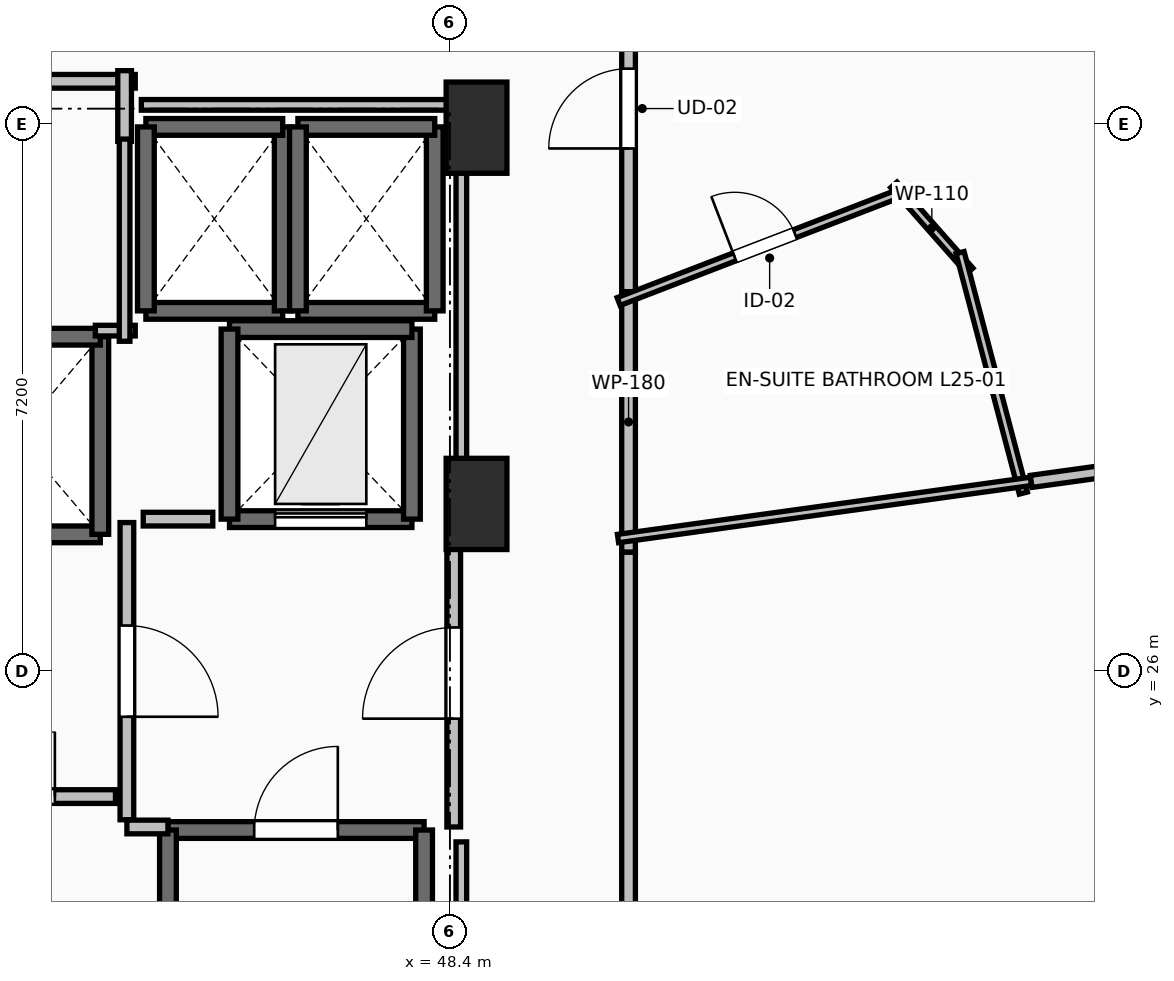
"""IFC4 building model, lengths in metres.
Left out: names, types, materials, properties, quantities, classifications, styles, units other than length and angle.
Written with IfcOpenShell. Run it as: python <this file> out.ifc"""

import sys

from ifc_helpers import new_model, si_unit, direction, frame, frame_2d, origin, origin_2d, place, context, subcontext, project, spatial, rectangle, extrude, element, fill, save


model = new_model("IFC4")
c1 = context("Model", 3, precision=1e-05, world=origin(), true_north=direction((0.0, 1.0)))
c2 = subcontext(c1, "Body", "Model", "MODEL_VIEW")
j1 = project(units=[si_unit("LENGTHUNIT", "METRE"), si_unit("PLANEANGLEUNIT", "RADIAN")], contexts=[c1])
p1 = place(None, origin())
s1 = spatial("IfcSite", under=j1, at=p1, CompositionType="ELEMENT")
p2 = place(p1, origin())
s2 = spatial("IfcBuilding", under=s1, at=p2, CompositionType="ELEMENT")
p3 = place(p2, frame((0.0, 0.0, 96.3)))
s3 = spatial("IfcBuildingStorey", under=s2, at=p3, CompositionType="ELEMENT", Elevation=96.3)
for number, where, z_axis, x_axis in (
    (1, (48.75, 33.15, 0.0), (0.0, 0.0, 1.0), (1.0, 0.0, 0.0)),
    (2, (48.75, 28.2, 0.0), (0.0, 0.0, 1.0), (1.0, 0.0, 0.0)),
):
    element("IfcColumn", number, at=place(p3, frame(where, z_axis=z_axis, x_axis=x_axis)), inside=s3, PredefinedType="PILASTER", context=c2, shape_type="SweptSolid", body=[
        extrude(rectangle(XDim=0.8, YDim=1.2, at=origin_2d()), origin(), (0.0, 0.0, 1.0), 3.5),
    ])
p4 = place(p3, frame((44.69, 23.91, 0.0), z_axis=(0.0, 0.0, 1.0), x_axis=(1.0, 0.0, 0.0)))
e3 = element("IfcWall", 3, at=p4, inside=s3, PredefinedType="SOLIDWALL", context=c2, shape_type="SweptSolid", body=[
    extrude(rectangle(XDim=3.37, YDim=0.22, at=frame_2d((1.685, 0.0))), origin(), (0.0, 0.0, 1.0), 3.24),
])
p5 = place(p4, frame((1.135, 0.0, 0.0)))
e4 = element("IfcOpeningElement", 4, at=p5, cuts=e3, PredefinedType="OPENING", context=c2, shape_type="SweptSolid", body=[
    extrude(rectangle(XDim=1.1, YDim=2.15, at=frame_2d((0.55, 1.075))), frame((0.0, 0.125, 0.0), z_axis=(0.0, -1.0, 0.0), x_axis=(1.0, 0.0, 0.0)), (0.0, 0.0, 1.0), 0.25),
])
for number, where, z_axis, x_axis in (
    (5, (48.06, 23.91, 0.0), (0.0, 0.0, 1.0), (0.0, -1.0, 0.0)),
    (6, (44.69, 16.49, 0.0), (0.0, 0.0, 1.0), (0.0, 1.0, 0.0)),
):
    element("IfcWall", number, at=place(p3, frame(where, z_axis=z_axis, x_axis=x_axis)), inside=s3, PredefinedType="SOLIDWALL", context=c2, shape_type="SweptSolid", body=[
        extrude(rectangle(XDim=7.42, YDim=0.22, at=frame_2d((3.71, 0.0))), origin(), (0.0, 0.0, 1.0), 3.24),
    ])
p6 = place(p3, frame((41.6, 27.8, 0.0), z_axis=(0.0, 0.0, 1.0), x_axis=(1.0, 0.0, 0.0)))
e7 = element("IfcWall", 7, at=p6, inside=s3, PredefinedType="SOLIDWALL", context=c2, shape_type="SweptSolid", body=[
    extrude(rectangle(XDim=2.2, YDim=0.22, at=frame_2d((1.1, 0.0))), origin(), (0.0, 0.0, 1.0), 3.24),
])
p7 = place(p3, frame((43.8, 27.8, 0.0), z_axis=(0.0, 0.0, 1.0), x_axis=(0.0, 1.0, 0.0)))
e8 = element("IfcWall", 8, at=p7, inside=s3, PredefinedType="SOLIDWALL", context=c2, shape_type="SweptSolid", body=[
    extrude(rectangle(XDim=2.6, YDim=0.22, at=frame_2d((1.3, 0.0))), origin(), (0.0, 0.0, 1.0), 3.24),
])
p8 = place(p3, frame((43.8, 30.4, 0.0), z_axis=(0.0, 0.0, 1.0), x_axis=(-1.0, 0.0, 0.0)))
e9 = element("IfcWall", 9, at=p8, inside=s3, PredefinedType="SOLIDWALL", context=c2, shape_type="SweptSolid", body=[
    extrude(rectangle(XDim=2.2, YDim=0.22, at=frame_2d((1.1, 0.0))), origin(), (0.0, 0.0, 1.0), 3.24),
])
p9 = place(p3, frame((44.4, 30.74, 0.0), z_axis=(0.0, 0.0, 1.0), x_axis=(1.0, 0.0, 0.0)))
e10 = element("IfcWall", 10, at=p9, inside=s3, PredefinedType="SOLIDWALL", context=c2, shape_type="SweptSolid", body=[
    extrude(rectangle(XDim=1.8, YDim=0.22, at=frame_2d((0.9, 0.0))), origin(), (0.0, 0.0, 1.0), 3.24),
])
p10 = place(p3, frame((46.2, 30.74, 0.0), z_axis=(0.0, 0.0, 1.0), x_axis=(0.0, 1.0, 0.0)))
e11 = element("IfcWall", 11, at=p10, inside=s3, PredefinedType="SOLIDWALL", context=c2, shape_type="SweptSolid", body=[
    extrude(rectangle(XDim=2.42, YDim=0.22, at=frame_2d((1.21, 0.0))), origin(), (0.0, 0.0, 1.0), 3.24),
])
p11 = place(p3, frame((46.2, 33.16, 0.0), z_axis=(0.0, 0.0, 1.0), x_axis=(-1.0, 0.0, 0.0)))
e12 = element("IfcWall", 12, at=p11, inside=s3, PredefinedType="SOLIDWALL", context=c2, shape_type="SweptSolid", body=[
    extrude(rectangle(XDim=1.8, YDim=0.22, at=frame_2d((0.9, 0.0))), origin(), (0.0, 0.0, 1.0), 3.24),
])
p12 = place(p3, frame((44.4, 33.16, 0.0), z_axis=(0.0, 0.0, 1.0), x_axis=(0.0, -1.0, 0.0)))
e13 = element("IfcWall", 13, at=p12, inside=s3, PredefinedType="SOLIDWALL", context=c2, shape_type="SweptSolid", body=[
    extrude(rectangle(XDim=2.42, YDim=0.22, at=frame_2d((1.21, 0.0))), origin(), (0.0, 0.0, 1.0), 3.24),
])
p13 = place(p3, frame((46.4, 30.74, 0.0), z_axis=(0.0, 0.0, 1.0), x_axis=(1.0, 0.0, 0.0)))
e14 = element("IfcWall", 14, at=p13, inside=s3, PredefinedType="SOLIDWALL", context=c2, shape_type="SweptSolid", body=[
    extrude(rectangle(XDim=1.8, YDim=0.22, at=frame_2d((0.9, 0.0))), origin(), (0.0, 0.0, 1.0), 3.24),
])
p14 = place(p3, frame((48.2, 30.74, 0.0), z_axis=(0.0, 0.0, 1.0), x_axis=(0.0, 1.0, 0.0)))
e15 = element("IfcWall", 15, at=p14, inside=s3, PredefinedType="SOLIDWALL", context=c2, shape_type="SweptSolid", body=[
    extrude(rectangle(XDim=2.42, YDim=0.22, at=frame_2d((1.21, 0.0))), origin(), (0.0, 0.0, 1.0), 3.24),
])
p15 = place(p3, frame((48.2, 33.16, 0.0), z_axis=(0.0, 0.0, 1.0), x_axis=(-1.0, 0.0, 0.0)))
e16 = element("IfcWall", 16, at=p15, inside=s3, PredefinedType="SOLIDWALL", context=c2, shape_type="SweptSolid", body=[
    extrude(rectangle(XDim=1.8, YDim=0.22, at=frame_2d((0.9, 0.0))), origin(), (0.0, 0.0, 1.0), 3.24),
])
p16 = place(p3, frame((46.4, 33.16, 0.0), z_axis=(0.0, 0.0, 1.0), x_axis=(0.0, -1.0, 0.0)))
e17 = element("IfcWall", 17, at=p16, inside=s3, PredefinedType="SOLIDWALL", context=c2, shape_type="SweptSolid", body=[
    extrude(rectangle(XDim=2.42, YDim=0.22, at=frame_2d((1.21, 0.0))), origin(), (0.0, 0.0, 1.0), 3.24),
])
p17 = place(p3, frame((45.5, 28.0, 0.0), z_axis=(0.0, 0.0, 1.0), x_axis=(1.0, 0.0, 0.0)))
e18 = element("IfcWall", 18, at=p17, inside=s3, PredefinedType="SHEAR", context=c2, shape_type="SweptSolid", body=[
    extrude(rectangle(XDim=2.4, YDim=0.22, at=frame_2d((1.2, 0.0))), origin(), (0.0, 0.0, 1.0), 3.24),
])
p18 = place(p17, frame((0.6, 0.0, 0.0)))
e19 = element("IfcOpeningElement", 19, at=p18, cuts=e18, PredefinedType="OPENING", context=c2, shape_type="SweptSolid", body=[
    extrude(rectangle(XDim=1.2, YDim=2.2, at=frame_2d((0.6, 1.1))), frame((0.0, 0.125, 0.0), z_axis=(0.0, -1.0, 0.0), x_axis=(1.0, 0.0, 0.0)), (0.0, 0.0, 1.0), 0.25),
])
p19 = place(p3, frame((47.9, 28.0, 0.0), z_axis=(0.0, 0.0, 1.0), x_axis=(0.0, 1.0, 0.0)))
e20 = element("IfcWall", 20, at=p19, inside=s3, PredefinedType="SHEAR", context=c2, shape_type="SweptSolid", body=[
    extrude(rectangle(XDim=2.5, YDim=0.22, at=frame_2d((1.25, 0.0))), origin(), (0.0, 0.0, 1.0), 3.24),
])
p20 = place(p3, frame((47.9, 30.5, 0.0), z_axis=(0.0, 0.0, 1.0), x_axis=(-1.0, 0.0, 0.0)))
e21 = element("IfcWall", 21, at=p20, inside=s3, PredefinedType="SHEAR", context=c2, shape_type="SweptSolid", body=[
    extrude(rectangle(XDim=2.4, YDim=0.22, at=frame_2d((1.2, 0.0))), origin(), (0.0, 0.0, 1.0), 3.24),
])
p21 = place(p3, frame((45.5, 30.5, 0.0), z_axis=(0.0, 0.0, 1.0), x_axis=(0.0, -1.0, 0.0)))
e22 = element("IfcWall", 22, at=p21, inside=s3, PredefinedType="SHEAR", context=c2, shape_type="SweptSolid", body=[
    extrude(rectangle(XDim=2.5, YDim=0.22, at=frame_2d((1.25, 0.0))), origin(), (0.0, 0.0, 1.0), 3.24),
])
p22 = place(p3, frame((44.15, 27.955, 0.0), z_axis=(0.0, 0.0, 1.0), x_axis=(0.0, -1.0, 0.0)))
e23 = element("IfcWall", 23, at=p22, inside=s3, PredefinedType="PARTITIONING", context=c2, shape_type="SweptSolid", body=[
    extrude(rectangle(XDim=3.91, YDim=0.18, at=frame_2d((1.955, 0.0))), origin(), (0.0, 0.0, 1.0), 3.24),
])
p23 = place(p22, frame((1.355, 0.0, 0.0)))
e24 = element("IfcOpeningElement", 24, at=p23, cuts=e23, PredefinedType="OPENING", context=c2, shape_type="SweptSolid", body=[
    extrude(rectangle(XDim=1.2, YDim=2.15, at=frame_2d((0.6, 1.075))), frame((0.0, 0.105, 0.0), z_axis=(0.0, -1.0, 0.0), x_axis=(1.0, 0.0, 0.0)), (0.0, 0.0, 1.0), 0.21),
])
p24 = place(p3, frame((44.15, 23.95, 0.0), z_axis=(0.0, 0.0, 1.0), x_axis=(1.0, 0.0, 0.0)))
e25 = element("IfcWall", 25, at=p24, inside=s3, PredefinedType="PARTITIONING", context=c2, shape_type="SweptSolid", body=[
    extrude(rectangle(XDim=0.54, YDim=0.18, at=frame_2d((0.27, 0.0))), origin(), (0.0, 0.0, 1.0), 3.24),
])
p25 = place(p3, frame((48.45, 23.95, 0.0), z_axis=(0.0, 0.0, 1.0), x_axis=(0.0, 1.0, 0.0)))
e26 = element("IfcWall", 26, at=p25, inside=s3, PredefinedType="PARTITIONING", context=c2, shape_type="SweptSolid", body=[
    extrude(rectangle(XDim=4.05, YDim=0.18, at=frame_2d((2.025, 0.0))), origin(), (0.0, 0.0, 1.0), 3.24),
])
p26 = place(p25, frame((1.425, 0.0, 0.0)))
e27 = element("IfcOpeningElement", 27, at=p26, cuts=e26, PredefinedType="OPENING", context=c2, shape_type="SweptSolid", body=[
    extrude(rectangle(XDim=1.2, YDim=2.15, at=frame_2d((0.6, 1.075))), frame((0.0, 0.105, 0.0), z_axis=(0.0, -1.0, 0.0), x_axis=(1.0, 0.0, 0.0)), (0.0, 0.0, 1.0), 0.21),
])
p27 = place(p3, frame((41.555, 24.35, 0.0), z_axis=(0.0, 0.0, 1.0), x_axis=(1.0, 0.0, 0.0)))
e28 = element("IfcWall", 28, at=p27, inside=s3, PredefinedType="PARTITIONING", context=c2, shape_type="SweptSolid", body=[
    extrude(rectangle(XDim=2.445, YDim=0.18, at=frame_2d((1.223, 0.0))), origin(), (0.0, 0.0, 1.0), 3.24),
])
p28 = place(p27, frame((0.798, 0.0, 0.0)))
e29 = element("IfcOpeningElement", 29, at=p28, cuts=e28, PredefinedType="OPENING", context=c2, shape_type="SweptSolid", body=[
    extrude(rectangle(XDim=0.85, YDim=2.1, at=frame_2d((0.425, 1.05))), frame((0.0, 0.105, 0.0), z_axis=(0.0, -1.0, 0.0), x_axis=(1.0, 0.0, 0.0)), (0.0, 0.0, 1.0), 0.21),
])
p29 = place(p3, frame((44.26, 33.76, 0.0), z_axis=(0.0, 0.0, 1.0), x_axis=(-1.0, 0.0, 0.0)))
e30 = element("IfcWall", 30, at=p29, inside=s3, PredefinedType="PARTITIONING", context=c2, shape_type="SweptSolid", body=[
    extrude(rectangle(XDim=6.91, YDim=0.18, at=frame_2d((3.455, 0.0))), origin(), (0.0, 0.0, 1.0), 3.24),
])
p30 = place(p29, frame((3.03, 0.0, 0.0)))
e31 = element("IfcOpeningElement", 31, at=p30, cuts=e30, PredefinedType="OPENING", context=c2, shape_type="SweptSolid", body=[
    extrude(rectangle(XDim=0.85, YDim=2.1, at=frame_2d((0.425, 1.05))), frame((0.0, 0.105, 0.0), z_axis=(0.0, -1.0, 0.0), x_axis=(1.0, 0.0, 0.0)), (0.0, 0.0, 1.0), 0.21),
])
p31 = place(p3, frame((44.12, 32.97, 0.0), z_axis=(0.0, 0.0, 1.0), x_axis=(0.0, 1.0, 0.0)))
e32 = element("IfcWall", 32, at=p31, inside=s3, PredefinedType="PARTITIONING", context=c2, shape_type="SweptSolid", body=[
    extrude(rectangle(XDim=0.93, YDim=0.18, at=frame_2d((0.465, 0.0))), origin(), (0.0, 0.0, 1.0), 3.24),
])
p32 = place(p3, frame((50.75, 30.853, 0.0), z_axis=(0.0, 0.0, 1.0), x_axis=(0.0, 1.0, 0.0)))
e33 = element("IfcWall", 33, at=p32, inside=s3, PredefinedType="PARTITIONING", context=c2, shape_type="SweptSolid", body=[
    extrude(rectangle(XDim=5.097, YDim=0.18, at=frame_2d((2.548, 0.0))), origin(), (0.0, 0.0, 1.0), 2.432),
])
p33 = place(p32, frame((2.023, 0.0, 0.0)))
e34 = element("IfcOpeningElement", 34, at=p33, cuts=e33, PredefinedType="OPENING", context=c2, shape_type="SweptSolid", body=[
    extrude(rectangle(XDim=1.05, YDim=2.2, at=frame_2d((0.525, 1.1))), frame((0.0, 0.105, 0.0), z_axis=(0.0, -1.0, 0.0), x_axis=(1.0, 0.0, 0.0)), (0.0, 0.0, 1.0), 0.21),
])
p34 = place(p3, frame((50.75, 27.564, 0.0), z_axis=(0.0, 0.0, 1.0), x_axis=(0.0, 1.0, 0.0)))
e35 = element("IfcWall", 35, at=p34, inside=s3, PredefinedType="PARTITIONING", context=c2, shape_type="SweptSolid", body=[
    extrude(rectangle(XDim=3.429, YDim=0.18, at=frame_2d((1.714, 0.0))), origin(), (0.0, 0.0, 1.0), 2.432),
])
p35 = place(p3, frame((50.75, 16.409, 0.0), z_axis=(0.0, 0.0, 1.0), x_axis=(0.0, 1.0, 0.0)))
e36 = element("IfcWall", 36, at=p35, inside=s3, PredefinedType="PARTITIONING", context=c2, shape_type="SweptSolid", body=[
    extrude(rectangle(XDim=11.155, YDim=0.18, at=frame_2d((5.578, 0.0))), origin(), (0.0, 0.0, 1.0), 2.432),
])
p36 = place(p35, frame((5.077, 0.0, 0.0)))
e37 = element("IfcOpeningElement", 37, at=p36, cuts=e36, PredefinedType="OPENING", context=c2, shape_type="SweptSolid", body=[
    extrude(rectangle(XDim=1.0, YDim=2.15, at=frame_2d((0.5, 1.075))), frame((0.0, 0.105, 0.0), z_axis=(0.0, -1.0, 0.0), x_axis=(1.0, 0.0, 0.0)), (0.0, 0.0, 1.0), 0.21),
])
p37 = place(p3, frame((54.24, 32.398, 0.0), z_axis=(0.0, 0.0, 1.0), x_axis=(0.661931735756, -0.749564124808, 0.0)))
e38 = element("IfcWall", 38, at=p37, inside=s3, PredefinedType="PARTITIONING", context=c2, shape_type="SweptSolid", body=[
    extrude(rectangle(XDim=1.51, YDim=0.11, at=frame_2d((0.755, 0.0))), origin(), (0.0, 0.0, 1.0), 3.24),
])
p38 = place(p3, frame((55.111, 31.506, 0.0), z_axis=(0.0, 0.0, 1.0), x_axis=(0.254405137241, -0.967097733502, 0.0)))
e39 = element("IfcWall", 39, at=p38, inside=s3, PredefinedType="PARTITIONING", context=c2, shape_type="SweptSolid", body=[
    extrude(rectangle(XDim=3.271, YDim=0.11, at=frame_2d((1.636, 0.0))), origin(), (0.0, 0.0, 1.0), 2.922),
])
p39 = place(p3, frame((56.047, 28.497, 0.0), z_axis=(0.0, 0.0, 1.0), x_axis=(-0.990553307294, -0.137128207927, 0.0)))
e40 = element("IfcWall", 40, at=p39, inside=s3, PredefinedType="PARTITIONING", context=c2, shape_type="SweptSolid", body=[
    extrude(rectangle(XDim=5.487, YDim=0.11, at=frame_2d((2.744, 0.0))), origin(), (0.0, 0.0, 1.0), 2.432),
])
p40 = place(p3, frame((50.619, 30.863, 0.0), z_axis=(0.0, 0.0, 1.0), x_axis=(0.933189718051, 0.359384126144, 0.0)))
e41 = element("IfcWall", 41, at=p40, inside=s3, PredefinedType="PARTITIONING", context=c2, shape_type="SweptSolid", body=[
    extrude(rectangle(XDim=4.119, YDim=0.11, at=frame_2d((2.06, 0.0))), origin(), (0.0, 0.0, 1.0), 2.972),
])
p41 = place(p40, frame((1.635, 0.0, 0.0)))
e42 = element("IfcOpeningElement", 42, at=p41, cuts=e41, PredefinedType="OPENING", context=c2, shape_type="SweptSolid", body=[
    extrude(rectangle(XDim=0.85, YDim=2.1, at=frame_2d((0.425, 1.05))), frame((0.0, 0.07, 0.0), z_axis=(0.0, -1.0, 0.0), x_axis=(1.0, 0.0, 0.0)), (0.0, 0.0, 1.0), 0.14),
])
p42 = place(p3, frame((56.047, 28.497, 0.0), z_axis=(0.0, 0.0, 1.0), x_axis=(0.990569127114, 0.137013883997, 0.0)))
e43 = element("IfcWall", 43, at=p42, inside=s3, PredefinedType="PARTITIONING", context=c2, shape_type="SweptSolid", body=[
    extrude(rectangle(XDim=7.812, YDim=0.16, at=frame_2d((3.906, 0.0))), origin(), (0.0, 0.0, 1.0), 2.677),
])
p43 = place(p3, frame((45.28, 28.0, 0.0), z_axis=(0.0, 0.0, 1.0), x_axis=(-1.0, 0.0, 0.0)))
e44 = element("IfcWall", 44, at=p43, inside=s3, PredefinedType="PARTITIONING", context=c2, shape_type="SweptSolid", body=[
    extrude(rectangle(XDim=0.915, YDim=0.18, at=frame_2d((0.458, 0.0))), origin(), (0.0, 0.0, 1.0), 3.24),
])
p44 = place(p3, frame((43.735, 30.48, 0.0), z_axis=(0.0, 0.0, 1.0), x_axis=(1.0, 0.0, 0.0)))
e45 = element("IfcWall", 45, at=p44, inside=s3, PredefinedType="PARTITIONING", context=c2, shape_type="SweptSolid", body=[
    extrude(rectangle(XDim=0.525, YDim=0.14, at=frame_2d((0.262, 0.0))), origin(), (0.0, 0.0, 1.0), 3.24),
])
p45 = place(p3, frame((44.12, 30.34, 0.0), z_axis=(0.0, 0.0, 1.0), x_axis=(0.0, 1.0, 0.0)))
e46 = element("IfcWall", 46, at=p45, inside=s3, PredefinedType="PARTITIONING", context=c2, shape_type="SweptSolid", body=[
    extrude(rectangle(XDim=2.66, YDim=0.14, at=frame_2d((1.33, 0.0))), origin(), (0.0, 0.0, 1.0), 3.24),
])
p46 = place(p3, frame((44.34, 33.45, 0.0), z_axis=(0.0, 0.0, 1.0), x_axis=(1.0, 0.0, 0.0)))
e47 = element("IfcWall", 47, at=p46, inside=s3, PredefinedType="PARTITIONING", context=c2, shape_type="SweptSolid", body=[
    extrude(rectangle(XDim=4.21, YDim=0.14, at=frame_2d((2.105, 0.0))), origin(), (0.0, 0.0, 1.0), 2.432),
])
p47 = place(p3, frame((48.55, 33.45, 0.0), z_axis=(0.0, 0.0, 1.0), x_axis=(0.0, -1.0, 0.0)))
e48 = element("IfcWall", 48, at=p47, inside=s3, PredefinedType="PARTITIONING", context=c2, shape_type="SweptSolid", body=[
    extrude(rectangle(XDim=5.254, YDim=0.14, at=frame_2d((2.627, 0.0))), origin(), (0.0, 0.0, 1.0), 2.432),
])
p48 = place(p3, frame((48.55, 23.754, 0.0), z_axis=(0.0, 0.0, 1.0), x_axis=(0.0, -1.0, 0.0)))
e49 = element("IfcWall", 49, at=p48, inside=s3, PredefinedType="PARTITIONING", context=c2, shape_type="SweptSolid", body=[
    extrude(rectangle(XDim=7.514, YDim=0.14, at=frame_2d((3.757, 0.0))), origin(), (0.0, 0.0, 1.0), 2.432),
])
p49 = place(p5, origin())
e50 = element("IfcDoor", 50, at=p49, inside=s3, OperationType="SINGLE_SWING_RIGHT", PredefinedType="DOOR", context=c2, shape_type="SweptSolid", body=[
    extrude(rectangle(XDim=1.1, YDim=2.15, at=frame_2d((0.55, 1.075))), frame((0.0, 0.025, 0.0), z_axis=(0.0, -1.0, 0.0), x_axis=(1.0, 0.0, 0.0)), (0.0, 0.0, 1.0), 0.05),
])
fill(e4, e50)
p50 = place(p18, origin())
e51 = element("IfcDoor", 51, at=p50, inside=s3, OperationType="SLIDING_TO_LEFT", PredefinedType="DOOR", context=c2, shape_type="SweptSolid", body=[
    extrude(rectangle(XDim=1.2, YDim=2.2, at=frame_2d((0.6, 1.1))), frame((0.0, 0.025, 0.0), z_axis=(0.0, -1.0, 0.0), x_axis=(1.0, 0.0, 0.0)), (0.0, 0.0, 1.0), 0.05),
])
fill(e19, e51)
p51 = place(p23, origin())
e52 = element("IfcDoor", 52, at=p51, inside=s3, OperationType="SINGLE_SWING_RIGHT", PredefinedType="DOOR", context=c2, shape_type="SweptSolid", body=[
    extrude(rectangle(XDim=1.2, YDim=2.15, at=frame_2d((0.6, 1.075))), frame((0.0, 0.025, 0.0), z_axis=(0.0, -1.0, 0.0), x_axis=(1.0, 0.0, 0.0)), (0.0, 0.0, 1.0), 0.05),
])
fill(e24, e52)
p52 = place(p26, origin())
e53 = element("IfcDoor", 53, at=p52, inside=s3, OperationType="SINGLE_SWING_LEFT", PredefinedType="DOOR", context=c2, shape_type="SweptSolid", body=[
    extrude(rectangle(XDim=1.2, YDim=2.15, at=frame_2d((0.6, 1.075))), frame((0.0, 0.025, 0.0), z_axis=(0.0, -1.0, 0.0), x_axis=(1.0, 0.0, 0.0)), (0.0, 0.0, 1.0), 0.05),
])
fill(e27, e53)
p53 = place(p28, origin())
e54 = element("IfcDoor", 54, at=p53, inside=s3, OperationType="SINGLE_SWING_RIGHT", PredefinedType="DOOR", context=c2, shape_type="SweptSolid", body=[
    extrude(rectangle(XDim=0.85, YDim=2.1, at=frame_2d((0.425, 1.05))), frame((0.0, 0.025, 0.0), z_axis=(0.0, -1.0, 0.0), x_axis=(1.0, 0.0, 0.0)), (0.0, 0.0, 1.0), 0.05),
])
fill(e29, e54)
p54 = place(p33, origin())
e55 = element("IfcDoor", 55, at=p54, inside=s3, OperationType="SINGLE_SWING_LEFT", PredefinedType="DOOR", context=c2, shape_type="SweptSolid", body=[
    extrude(rectangle(XDim=1.05, YDim=2.2, at=frame_2d((0.525, 1.1))), frame((0.0, 0.025, 0.0), z_axis=(0.0, -1.0, 0.0), x_axis=(1.0, 0.0, 0.0)), (0.0, 0.0, 1.0), 0.05),
])
fill(e34, e55)
p55 = place(p41, origin())
e56 = element("IfcDoor", 56, at=p55, inside=s3, OperationType="SINGLE_SWING_LEFT", PredefinedType="DOOR", context=c2, shape_type="SweptSolid", body=[
    extrude(rectangle(XDim=0.85, YDim=2.1, at=frame_2d((0.425, 1.05))), frame((0.0, 0.025, 0.0), z_axis=(0.0, -1.0, 0.0), x_axis=(1.0, 0.0, 0.0)), (0.0, 0.0, 1.0), 0.05),
])
fill(e42, e56)
save(model, sys.argv[1])
